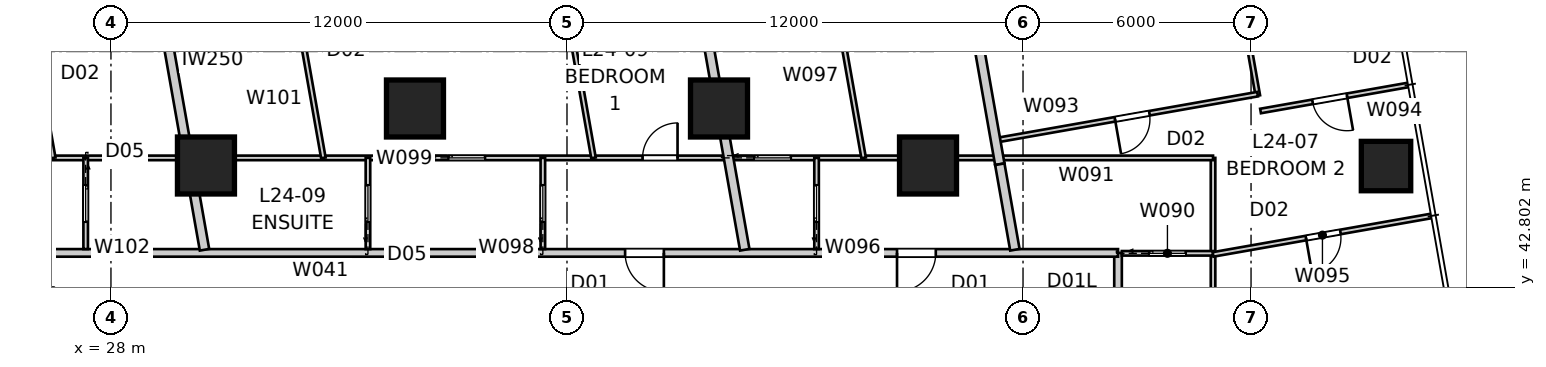
"""IFC4 building model, lengths in metres.
Left out: names, types, materials, properties, quantities, classifications, styles, units other than length and angle.
Written with IfcOpenShell. Run it as: python <this file> out.ifc"""

import sys

from ifc_helpers import new_model, si_unit, direction, frame, frame_2d, origin, origin_2d, place, context, subcontext, project, spatial, rectangle, extrude, element, fill, save


model = new_model("IFC4")
c1 = context("Model", 3, precision=1e-05, world=origin(), true_north=direction((0.0, 1.0)))
c2 = subcontext(c1, "Body", "Model", "MODEL_VIEW")
j1 = project(units=[si_unit("LENGTHUNIT", "METRE"), si_unit("PLANEANGLEUNIT", "RADIAN")], contexts=[c1])
p1 = place(None, origin())
s1 = spatial("IfcSite", under=j1, at=p1, CompositionType="ELEMENT")
p2 = place(p1, origin())
s2 = spatial("IfcBuilding", under=s1, at=p2, CompositionType="ELEMENT")
p3 = place(p2, frame((0.0, 0.0, 89.6)))
s3 = spatial("IfcBuildingStorey", under=s2, at=p3, CompositionType="ELEMENT", Elevation=89.6)
p4 = place(p3, frame((61.552, 45.985, 0.0), z_axis=(0.0, 0.0, 1.0), x_axis=(1.0, 0.0, 0.0)))
e1 = element("IfcColumn", 1, at=p4, inside=s3, PredefinedType="COLUMN", context=c2, shape_type="SweptSolid", body=[
    extrude(rectangle(XDim=1.3, YDim=1.3, at=origin_2d()), origin(), (0.0, 0.0, 1.0), 3.4),
])
for number, where, z_axis, x_axis in (
    (2, (49.5, 46.0, 0.0), (0.0, 0.0, 1.0), (1.0, 0.0, 0.0)),
    (3, (44.0, 47.5, 0.0), (0.0, 0.0, 1.0), (1.0, 0.0, 0.0)),
    (4, (36.0, 47.5, 0.0), (0.0, 0.0, 1.0), (1.0, 0.0, 0.0)),
    (5, (30.5, 46.0, 0.0), (0.0, 0.0, 1.0), (1.0, 0.0, 0.0)),
):
    element("IfcColumn", number, at=place(p3, frame(where, z_axis=z_axis, x_axis=x_axis)), inside=s3, PredefinedType="COLUMN", context=c2, shape_type="SweptSolid", body=[
        extrude(rectangle(XDim=1.5, YDim=1.5, at=origin_2d()), origin(), (0.0, 0.0, 1.0), 3.4),
    ])
p5 = place(p3, frame((54.5, 16.3, 0.0), z_axis=(0.0, 0.0, 1.0), x_axis=(0.0, 1.0, 0.0)))
e6 = element("IfcWall", 6, at=p5, inside=s3, PredefinedType="PARTITIONING", context=c2, shape_type="SweptSolid", body=[
    extrude(rectangle(XDim=27.4, YDim=0.2, at=frame_2d((13.7, 0.0))), origin(), (0.0, 0.0, 1.0), 3.25),
])
p6 = place(p5, frame((19.308, 0.0, 0.0)))
e7 = element("IfcOpeningElement", 7, at=p6, cuts=e6, PredefinedType="OPENING", context=c2, shape_type="SweptSolid", body=[
    extrude(rectangle(XDim=1.02, YDim=2.34, at=frame_2d((0.51, 1.17))), frame((0.0, 0.11, 0.0), z_axis=(0.0, -1.0, 0.0), x_axis=(1.0, 0.0, 0.0)), (0.0, 0.0, 1.0), 0.22),
])
p7 = place(p5, frame((24.687, 0.0, 0.0)))
e8 = element("IfcOpeningElement", 8, at=p7, cuts=e6, PredefinedType="OPENING", context=c2, shape_type="SweptSolid", body=[
    extrude(rectangle(XDim=1.02, YDim=2.1, at=frame_2d((0.51, 1.05))), frame((0.0, 0.11, 0.0), z_axis=(0.0, -1.0, 0.0), x_axis=(1.0, 0.0, 0.0)), (0.0, 0.0, 1.0), 0.22),
])
p8 = place(p5, frame((1.622, 0.0, 0.0)))
e9 = element("IfcOpeningElement", 9, at=p8, cuts=e6, PredefinedType="OPENING", context=c2, shape_type="SweptSolid", body=[
    extrude(rectangle(XDim=1.02, YDim=2.1, at=frame_2d((0.51, 1.05))), frame((0.0, 0.11, 0.0), z_axis=(0.0, -1.0, 0.0), x_axis=(1.0, 0.0, 0.0)), (0.0, 0.0, 1.0), 0.22),
])
p9 = place(p3, frame((54.5, 43.7, 0.0), z_axis=(0.0, 0.0, 1.0), x_axis=(-1.0, 0.0, 0.0)))
e10 = element("IfcWall", 10, at=p9, inside=s3, PredefinedType="PARTITIONING", context=c2, shape_type="SweptSolid", body=[
    extrude(rectangle(XDim=29.0, YDim=0.2, at=frame_2d((14.5, 0.0))), origin(), (0.0, 0.0, 1.0), 3.25),
])
p10 = place(p9, frame((11.951, 0.0, 0.0)))
e11 = element("IfcOpeningElement", 11, at=p10, cuts=e10, PredefinedType="OPENING", context=c2, shape_type="SweptSolid", body=[
    extrude(rectangle(XDim=1.02, YDim=2.34, at=frame_2d((0.51, 1.17))), frame((0.0, 0.11, 0.0), z_axis=(0.0, -1.0, 0.0), x_axis=(1.0, 0.0, 0.0)), (0.0, 0.0, 1.0), 0.22),
])
p11 = place(p9, frame((4.795, 0.0, 0.0)))
e12 = element("IfcOpeningElement", 12, at=p11, cuts=e10, PredefinedType="OPENING", context=c2, shape_type="SweptSolid", body=[
    extrude(rectangle(XDim=1.02, YDim=2.34, at=frame_2d((0.51, 1.17))), frame((0.0, 0.11, 0.0), z_axis=(0.0, -1.0, 0.0), x_axis=(1.0, 0.0, 0.0)), (0.0, 0.0, 1.0), 0.22),
])
p12 = place(p3, frame((42.552, 55.836, 0.0), z_axis=(0.0, 0.0, 1.0), x_axis=(0.173639677872, -0.984809251718, 0.0)))
e13 = element("IfcWall", 13, at=p12, inside=s3, PredefinedType="PARTITIONING", context=c2, shape_type="SweptSolid", body=[
    extrude(rectangle(XDim=12.24, YDim=0.25, at=frame_2d((6.12, 0.0))), origin(), (0.0, 0.0, 1.0), 3.25),
])
p13 = place(p3, frame((28.765, 53.405, 0.0), z_axis=(0.0, 0.0, 1.0), x_axis=(0.173658469802, -0.984805938176, 0.0)))
e14 = element("IfcWall", 14, at=p13, inside=s3, PredefinedType="PARTITIONING", context=c2, shape_type="SweptSolid", body=[
    extrude(rectangle(XDim=9.771, YDim=0.25, at=frame_2d((4.885, 0.0))), origin(), (0.0, 0.0, 1.0), 3.25),
])
p14 = place(p3, frame((49.62, 56.066, 0.0), z_axis=(0.0, 0.0, 1.0), x_axis=(0.173644522411, -0.984808397525, 0.0)))
e15 = element("IfcWall", 15, at=p14, inside=s3, PredefinedType="PARTITIONING", context=c2, shape_type="SweptSolid", body=[
    extrude(rectangle(XDim=10.188, YDim=0.25, at=frame_2d((5.094, 0.0))), origin(), (0.0, 0.0, 1.0), 2.638),
])
p15 = place(p3, frame((51.389, 46.033, 0.0), z_axis=(0.0, 0.0, 1.0), x_axis=(0.173657387043, -0.984806129106, 0.0)))
e16 = element("IfcWall", 16, at=p15, inside=s3, PredefinedType="PARTITIONING", context=c2, shape_type="SweptSolid", body=[
    extrude(rectangle(XDim=2.286, YDim=0.25, at=frame_2d((1.143, 0.0))), origin(), (0.0, 0.0, 1.0), 3.25),
])
p16 = place(p3, frame((57.0, 46.2, 0.0), z_axis=(0.0, 0.0, 1.0), x_axis=(0.0, -1.0, 0.0)))
e17 = element("IfcWall", 17, at=p16, inside=s3, PredefinedType="PARTITIONING", context=c2, shape_type="SweptSolid", body=[
    extrude(rectangle(XDim=32.4, YDim=0.12, at=frame_2d((16.2, 0.0))), origin(), (0.0, 0.0, 1.0), 2.55),
])
p17 = place(p16, frame((10.396, 0.0, 0.0)))
e18 = element("IfcOpeningElement", 18, at=p17, cuts=e17, PredefinedType="OPENING", context=c2, shape_type="SweptSolid", body=[
    extrude(rectangle(XDim=0.92, YDim=2.34, at=frame_2d((0.46, 1.17))), frame((0.0, 0.07, 0.0), z_axis=(0.0, -1.0, 0.0), x_axis=(1.0, 0.0, 0.0)), (0.0, 0.0, 1.0), 0.14),
])
p18 = place(p16, frame((7.587, 0.0, 0.0)))
e19 = element("IfcOpeningElement", 19, at=p18, cuts=e17, PredefinedType="OPENING", context=c2, shape_type="SweptSolid", body=[
    extrude(rectangle(XDim=0.92, YDim=2.34, at=frame_2d((0.46, 1.17))), frame((0.0, 0.07, 0.0), z_axis=(0.0, -1.0, 0.0), x_axis=(1.0, 0.0, 0.0)), (0.0, 0.0, 1.0), 0.14),
])
p19 = place(p16, frame((3.843, 0.0, 0.0)))
e20 = element("IfcOpeningElement", 20, at=p19, cuts=e17, PredefinedType="OPENING", context=c2, shape_type="SweptSolid", body=[
    extrude(rectangle(XDim=0.92, YDim=2.34, at=frame_2d((0.46, 1.17))), frame((0.0, 0.07, 0.0), z_axis=(0.0, -1.0, 0.0), x_axis=(1.0, 0.0, 0.0)), (0.0, 0.0, 1.0), 0.14),
])
p20 = place(p16, frame((27.988, 0.0, 0.0)))
e21 = element("IfcOpeningElement", 21, at=p20, cuts=e17, PredefinedType="OPENING", context=c2, shape_type="SweptSolid", body=[
    extrude(rectangle(XDim=0.92, YDim=2.34, at=frame_2d((0.46, 1.17))), frame((0.0, 0.07, 0.0), z_axis=(0.0, -1.0, 0.0), x_axis=(1.0, 0.0, 0.0)), (0.0, 0.0, 1.0), 0.14),
])
p21 = place(p16, frame((23.957, 0.0, 0.0)))
e22 = element("IfcOpeningElement", 22, at=p21, cuts=e17, PredefinedType="OPENING", context=c2, shape_type="SweptSolid", body=[
    extrude(rectangle(XDim=0.96, YDim=2.1, at=frame_2d((0.48, 1.05))), frame((0.0, 0.07, 0.0), z_axis=(0.0, -1.0, 0.0), x_axis=(1.0, 0.0, 0.0)), (0.0, 0.0, 1.0), 0.14),
])
p22 = place(p16, frame((21.108, 0.0, 0.0)))
e23 = element("IfcOpeningElement", 23, at=p22, cuts=e17, PredefinedType="OPENING", context=c2, shape_type="SweptSolid", body=[
    extrude(rectangle(XDim=0.96, YDim=2.1, at=frame_2d((0.48, 1.05))), frame((0.0, 0.07, 0.0), z_axis=(0.0, -1.0, 0.0), x_axis=(1.0, 0.0, 0.0)), (0.0, 0.0, 1.0), 0.14),
])
p23 = place(p3, frame((54.6, 43.689, 0.0), z_axis=(0.0, 0.0, 1.0), x_axis=(1.0, 0.0, 0.0)))
e24 = element("IfcWall", 24, at=p23, inside=s3, PredefinedType="PARTITIONING", context=c2, shape_type="SweptSolid", body=[
    extrude(rectangle(XDim=2.4, YDim=0.12, at=frame_2d((1.2, 0.0))), origin(), (0.0, 0.0, 1.0), 3.25),
])
p24 = place(p23, frame((0.72, 0.0, 0.0)))
e25 = element("IfcOpeningElement", 25, at=p24, cuts=e24, PredefinedType="OPENING", context=c2, shape_type="SweptSolid", body=[
    extrude(rectangle(XDim=0.96, YDim=2.1, at=frame_2d((0.48, 1.05))), frame((0.0, 0.07, 0.0), z_axis=(0.0, -1.0, 0.0), x_axis=(1.0, 0.0, 0.0)), (0.0, 0.0, 1.0), 0.14),
])
p25 = place(p3, frame((23.0, 46.2, 0.0), z_axis=(0.0, 0.0, 1.0), x_axis=(1.0, 0.0, 0.0)))
e26 = element("IfcWall", 26, at=p25, inside=s3, PredefinedType="PARTITIONING", context=c2, shape_type="SweptSolid", body=[
    extrude(rectangle(XDim=34.0, YDim=0.12, at=frame_2d((17.0, 0.0))), origin(), (0.0, 0.0, 1.0), 2.55),
])
p26 = place(p25, frame((18.989, 0.0, 0.0)))
e27 = element("IfcOpeningElement", 27, at=p26, cuts=e26, PredefinedType="OPENING", context=c2, shape_type="SweptSolid", body=[
    extrude(rectangle(XDim=0.92, YDim=2.34, at=frame_2d((0.46, 1.17))), frame((0.0, 0.07, 0.0), z_axis=(0.0, -1.0, 0.0), x_axis=(1.0, 0.0, 0.0)), (0.0, 0.0, 1.0), 0.14),
])
p27 = place(p25, frame((1.306, 0.0, 0.0)))
e28 = element("IfcOpeningElement", 28, at=p27, cuts=e26, PredefinedType="OPENING", context=c2, shape_type="SweptSolid", body=[
    extrude(rectangle(XDim=0.92, YDim=2.34, at=frame_2d((0.46, 1.17))), frame((0.0, 0.07, 0.0), z_axis=(0.0, -1.0, 0.0), x_axis=(1.0, 0.0, 0.0)), (0.0, 0.0, 1.0), 0.14),
])
p28 = place(p25, frame((13.884, 0.0, 0.0)))
e29 = element("IfcOpeningElement", 29, at=p28, cuts=e26, PredefinedType="OPENING", context=c2, shape_type="SweptSolid", body=[
    extrude(rectangle(XDim=0.96, YDim=2.1, at=frame_2d((0.48, 1.05))), frame((0.0, 0.07, 0.0), z_axis=(0.0, -1.0, 0.0), x_axis=(1.0, 0.0, 0.0)), (0.0, 0.0, 1.0), 0.14),
])
p29 = place(p25, frame((21.929, 0.0, 0.0)))
e30 = element("IfcOpeningElement", 30, at=p29, cuts=e26, PredefinedType="OPENING", context=c2, shape_type="SweptSolid", body=[
    extrude(rectangle(XDim=0.96, YDim=2.1, at=frame_2d((0.48, 1.05))), frame((0.0, 0.07, 0.0), z_axis=(0.0, -1.0, 0.0), x_axis=(1.0, 0.0, 0.0)), (0.0, 0.0, 1.0), 0.14),
])
p30 = place(p3, frame((57.041, 54.288, 0.0), z_axis=(0.0, 0.0, 1.0), x_axis=(0.173657751636, -0.984806064815, 0.0)))
e31 = element("IfcWall", 31, at=p30, inside=s3, PredefinedType="PARTITIONING", context=c2, shape_type="SweptSolid", body=[
    extrude(rectangle(XDim=6.55, YDim=0.12, at=frame_2d((3.275, 0.0))), origin(), (0.0, 0.0, 1.0), 3.25),
])
p31 = place(p3, frame((58.172, 47.877, 0.0), z_axis=(0.0, 0.0, 1.0), x_axis=(-0.984806372973, -0.173656004074, 0.0)))
e32 = element("IfcWall", 32, at=p31, inside=s3, PredefinedType="PARTITIONING", context=c2, shape_type="SweptSolid", body=[
    extrude(rectangle(XDim=7.0, YDim=0.12, at=frame_2d((3.5, 0.0))), origin(), (0.0, 0.0, 1.0), 3.25),
])
p32 = place(p31, frame((2.89, 0.0, 0.0)))
e33 = element("IfcOpeningElement", 33, at=p32, cuts=e32, PredefinedType="OPENING", context=c2, shape_type="SweptSolid", body=[
    extrude(rectangle(XDim=0.92, YDim=2.34, at=frame_2d((0.46, 1.17))), frame((0.0, 0.07, 0.0), z_axis=(0.0, -1.0, 0.0), x_axis=(1.0, 0.0, 0.0)), (0.0, 0.0, 1.0), 0.14),
])
p33 = place(p3, frame((62.15, 48.122, 0.0), z_axis=(0.0, 0.0, 1.0), x_axis=(-0.984804033163, -0.173669272657, 0.0)))
e34 = element("IfcWall", 34, at=p33, inside=s3, PredefinedType="PARTITIONING", context=c2, shape_type="SweptSolid", body=[
    extrude(rectangle(XDim=3.96, YDim=0.12, at=frame_2d((1.98, 0.0))), origin(), (0.0, 0.0, 1.0), 2.638),
])
p34 = place(p33, frame((1.65, 0.0, 0.0)))
e35 = element("IfcOpeningElement", 35, at=p34, cuts=e34, PredefinedType="OPENING", context=c2, shape_type="SweptSolid", body=[
    extrude(rectangle(XDim=0.92, YDim=2.34, at=frame_2d((0.46, 1.17))), frame((0.0, 0.07, 0.0), z_axis=(0.0, -1.0, 0.0), x_axis=(1.0, 0.0, 0.0)), (0.0, 0.0, 1.0), 0.14),
])
p35 = place(p3, frame((62.758, 44.675, 0.0), z_axis=(0.0, 0.0, 1.0), x_axis=(-0.984810032319, -0.173635250578, 0.0)))
e36 = element("IfcWall", 36, at=p35, inside=s3, PredefinedType="PARTITIONING", context=c2, shape_type="SweptSolid", body=[
    extrude(rectangle(XDim=5.846, YDim=0.12, at=frame_2d((2.923, 0.0))), origin(), (0.0, 0.0, 1.0), 3.25),
])
p36 = place(p35, frame((2.443, 0.0, 0.0)))
e37 = element("IfcOpeningElement", 37, at=p36, cuts=e36, PredefinedType="OPENING", context=c2, shape_type="SweptSolid", body=[
    extrude(rectangle(XDim=0.92, YDim=2.34, at=frame_2d((0.46, 1.17))), frame((0.0, 0.07, 0.0), z_axis=(0.0, -1.0, 0.0), x_axis=(1.0, 0.0, 0.0)), (0.0, 0.0, 1.0), 0.14),
])
p37 = place(p3, frame((46.567, 43.8, 0.0), z_axis=(0.0, 0.0, 1.0), x_axis=(0.0, 1.0, 0.0)))
e38 = element("IfcWall", 38, at=p37, inside=s3, PredefinedType="PARTITIONING", context=c2, shape_type="SweptSolid", body=[
    extrude(rectangle(XDim=2.4, YDim=0.12, at=frame_2d((1.2, 0.0))), origin(), (0.0, 0.0, 1.0), 3.25),
])
p38 = place(p37, frame((0.72, 0.0, 0.0)))
e39 = element("IfcOpeningElement", 39, at=p38, cuts=e38, PredefinedType="OPENING", context=c2, shape_type="SweptSolid", body=[
    extrude(rectangle(XDim=0.96, YDim=2.1, at=frame_2d((0.48, 1.05))), frame((0.0, 0.07, 0.0), z_axis=(0.0, -1.0, 0.0), x_axis=(1.0, 0.0, 0.0)), (0.0, 0.0, 1.0), 0.14),
])
p39 = place(p3, frame((47.805, 46.2, 0.0), z_axis=(0.0, 0.0, 1.0), x_axis=(-0.173653605279, 0.984806795962, 0.0)))
e40 = element("IfcWall", 40, at=p39, inside=s3, PredefinedType="PARTITIONING", context=c2, shape_type="SweptSolid", body=[
    extrude(rectangle(XDim=10.362, YDim=0.12, at=frame_2d((5.181, 0.0))), origin(), (0.0, 0.0, 1.0), 3.25),
])
p40 = place(p39, frame((4.741, 0.0, 0.0)))
e41 = element("IfcOpeningElement", 41, at=p40, cuts=e40, PredefinedType="OPENING", context=c2, shape_type="SweptSolid", body=[
    extrude(rectangle(XDim=0.92, YDim=2.34, at=frame_2d((0.46, 1.17))), frame((0.0, 0.07, 0.0), z_axis=(0.0, -1.0, 0.0), x_axis=(1.0, 0.0, 0.0)), (0.0, 0.0, 1.0), 0.14),
])
p41 = place(p3, frame((39.365, 43.8, 0.0), z_axis=(0.0, 0.0, 1.0), x_axis=(0.0, 1.0, 0.0)))
e42 = element("IfcWall", 42, at=p41, inside=s3, PredefinedType="PARTITIONING", context=c2, shape_type="SweptSolid", body=[
    extrude(rectangle(XDim=2.4, YDim=0.12, at=frame_2d((1.2, 0.0))), origin(), (0.0, 0.0, 1.0), 3.25),
])
p42 = place(p41, frame((0.72, 0.0, 0.0)))
e43 = element("IfcOpeningElement", 43, at=p42, cuts=e42, PredefinedType="OPENING", context=c2, shape_type="SweptSolid", body=[
    extrude(rectangle(XDim=0.96, YDim=2.1, at=frame_2d((0.48, 1.05))), frame((0.0, 0.07, 0.0), z_axis=(0.0, -1.0, 0.0), x_axis=(1.0, 0.0, 0.0)), (0.0, 0.0, 1.0), 0.14),
])
p43 = place(p3, frame((34.763, 43.8, 0.0), z_axis=(0.0, 0.0, 1.0), x_axis=(0.0, 1.0, 0.0)))
e44 = element("IfcWall", 44, at=p43, inside=s3, PredefinedType="PARTITIONING", context=c2, shape_type="SweptSolid", body=[
    extrude(rectangle(XDim=2.4, YDim=0.12, at=frame_2d((1.2, 0.0))), origin(), (0.0, 0.0, 1.0), 3.25),
])
p44 = place(p43, frame((0.72, 0.0, 0.0)))
e45 = element("IfcOpeningElement", 45, at=p44, cuts=e44, PredefinedType="OPENING", context=c2, shape_type="SweptSolid", body=[
    extrude(rectangle(XDim=0.96, YDim=2.1, at=frame_2d((0.48, 1.05))), frame((0.0, 0.07, 0.0), z_axis=(0.0, -1.0, 0.0), x_axis=(1.0, 0.0, 0.0)), (0.0, 0.0, 1.0), 0.14),
])
p45 = place(p3, frame((39.113, 55.188, 0.0), z_axis=(0.0, 0.0, 1.0), x_axis=(0.173652576186, -0.984806977424, 0.0)))
e46 = element("IfcWall", 46, at=p45, inside=s3, PredefinedType="PARTITIONING", context=c2, shape_type="SweptSolid", body=[
    extrude(rectangle(XDim=9.127, YDim=0.12, at=frame_2d((4.563, 0.0))), origin(), (0.0, 0.0, 1.0), 3.25),
])
p46 = place(p3, frame((33.59, 46.2, 0.0), z_axis=(0.0, 0.0, 1.0), x_axis=(-0.173645935638, 0.98480814834, 0.0)))
e47 = element("IfcWall", 47, at=p46, inside=s3, PredefinedType="PARTITIONING", context=c2, shape_type="SweptSolid", body=[
    extrude(rectangle(XDim=7.893, YDim=0.12, at=frame_2d((3.947, 0.0))), origin(), (0.0, 0.0, 1.0), 3.25),
])
p47 = place(p46, frame((3.507, 0.0, 0.0)))
e48 = element("IfcOpeningElement", 48, at=p47, cuts=e47, PredefinedType="OPENING", context=c2, shape_type="SweptSolid", body=[
    extrude(rectangle(XDim=0.92, YDim=2.34, at=frame_2d((0.46, 1.17))), frame((0.0, 0.07, 0.0), z_axis=(0.0, -1.0, 0.0), x_axis=(1.0, 0.0, 0.0)), (0.0, 0.0, 1.0), 0.14),
])
p48 = place(p3, frame((27.335, 46.2, 0.0), z_axis=(0.0, 0.0, 1.0), x_axis=(0.0, -1.0, 0.0)))
e49 = element("IfcWall", 49, at=p48, inside=s3, PredefinedType="PARTITIONING", context=c2, shape_type="SweptSolid", body=[
    extrude(rectangle(XDim=2.4, YDim=0.12, at=frame_2d((1.2, 0.0))), origin(), (0.0, 0.0, 1.0), 2.722),
])
p49 = place(p48, frame((0.72, 0.0, 0.0)))
e50 = element("IfcOpeningElement", 50, at=p49, cuts=e49, PredefinedType="OPENING", context=c2, shape_type="SweptSolid", body=[
    extrude(rectangle(XDim=0.96, YDim=2.1, at=frame_2d((0.48, 1.05))), frame((0.0, 0.07, 0.0), z_axis=(0.0, -1.0, 0.0), x_axis=(1.0, 0.0, 0.0)), (0.0, 0.0, 1.0), 0.14),
])
p50 = place(p3, frame((26.481, 46.2, 0.0), z_axis=(0.0, 0.0, 1.0), x_axis=(-0.173643103339, 0.98480864774, 0.0)))
e51 = element("IfcWall", 51, at=p50, inside=s3, PredefinedType="PARTITIONING", context=c2, shape_type="SweptSolid", body=[
    extrude(rectangle(XDim=6.659, YDim=0.12, at=frame_2d((3.329, 0.0))), origin(), (0.0, 0.0, 1.0), 3.25),
])
p51 = place(p50, frame((2.889, 0.0, 0.0)))
e52 = element("IfcOpeningElement", 52, at=p51, cuts=e51, PredefinedType="OPENING", context=c2, shape_type="SweptSolid", body=[
    extrude(rectangle(XDim=0.92, YDim=2.34, at=frame_2d((0.46, 1.17))), frame((0.0, 0.07, 0.0), z_axis=(0.0, -1.0, 0.0), x_axis=(1.0, 0.0, 0.0)), (0.0, 0.0, 1.0), 0.14),
])
p52 = place(p10, origin())
e53 = element("IfcDoor", 53, at=p52, inside=s3, OperationType="SINGLE_SWING_LEFT", PredefinedType="DOOR", context=c2, shape_type="SweptSolid", body=[
    extrude(rectangle(XDim=1.02, YDim=2.34, at=frame_2d((0.51, 1.17))), frame((0.0, 0.025, 0.0), z_axis=(0.0, -1.0, 0.0), x_axis=(1.0, 0.0, 0.0)), (0.0, 0.0, 1.0), 0.05),
])
fill(e11, e53)
p53 = place(p11, origin())
e54 = element("IfcDoor", 54, at=p53, inside=s3, OperationType="SINGLE_SWING_RIGHT", PredefinedType="DOOR", context=c2, shape_type="SweptSolid", body=[
    extrude(rectangle(XDim=1.02, YDim=2.34, at=frame_2d((0.51, 1.17))), frame((0.0, 0.025, 0.0), z_axis=(0.0, -1.0, 0.0), x_axis=(1.0, 0.0, 0.0)), (0.0, 0.0, 1.0), 0.05),
])
fill(e12, e54)
p54 = place(p26, origin())
e55 = element("IfcDoor", 55, at=p54, inside=s3, OperationType="SINGLE_SWING_RIGHT", PredefinedType="DOOR", context=c2, shape_type="SweptSolid", body=[
    extrude(rectangle(XDim=0.92, YDim=2.34, at=frame_2d((0.46, 1.17))), frame((0.0, 0.025, 0.0), z_axis=(0.0, -1.0, 0.0), x_axis=(1.0, 0.0, 0.0)), (0.0, 0.0, 1.0), 0.05),
])
fill(e27, e55)
p55 = place(p42, origin())
e56 = element("IfcDoor", 56, at=p55, inside=s3, OperationType="SLIDING_TO_LEFT", PredefinedType="DOOR", context=c2, shape_type="SweptSolid", body=[
    extrude(rectangle(XDim=0.96, YDim=2.1, at=frame_2d((0.48, 1.05))), frame((0.0, 0.025, 0.0), z_axis=(0.0, -1.0, 0.0), x_axis=(1.0, 0.0, 0.0)), (0.0, 0.0, 1.0), 0.05),
])
fill(e43, e56)
p56 = place(p38, origin())
e57 = element("IfcDoor", 57, at=p56, inside=s3, OperationType="SLIDING_TO_LEFT", PredefinedType="DOOR", context=c2, shape_type="SweptSolid", body=[
    extrude(rectangle(XDim=0.96, YDim=2.1, at=frame_2d((0.48, 1.05))), frame((0.0, 0.025, 0.0), z_axis=(0.0, -1.0, 0.0), x_axis=(1.0, 0.0, 0.0)), (0.0, 0.0, 1.0), 0.05),
])
fill(e39, e57)
p57 = place(p24, origin())
e58 = element("IfcDoor", 58, at=p57, inside=s3, OperationType="SLIDING_TO_LEFT", PredefinedType="DOOR", context=c2, shape_type="SweptSolid", body=[
    extrude(rectangle(XDim=0.96, YDim=2.1, at=frame_2d((0.48, 1.05))), frame((0.0, 0.025, 0.0), z_axis=(0.0, -1.0, 0.0), x_axis=(1.0, 0.0, 0.0)), (0.0, 0.0, 1.0), 0.05),
])
fill(e25, e58)
p58 = place(p49, origin())
e59 = element("IfcDoor", 59, at=p58, inside=s3, OperationType="SLIDING_TO_LEFT", PredefinedType="DOOR", context=c2, shape_type="SweptSolid", body=[
    extrude(rectangle(XDim=0.96, YDim=2.1, at=frame_2d((0.48, 1.05))), frame((0.0, 0.025, 0.0), z_axis=(0.0, -1.0, 0.0), x_axis=(1.0, 0.0, 0.0)), (0.0, 0.0, 1.0), 0.05),
])
fill(e50, e59)
p59 = place(p28, origin())
e60 = element("IfcDoor", 60, at=p59, inside=s3, OperationType="SLIDING_TO_LEFT", PredefinedType="DOOR", context=c2, shape_type="SweptSolid", body=[
    extrude(rectangle(XDim=0.96, YDim=2.1, at=frame_2d((0.48, 1.05))), frame((0.0, 0.025, 0.0), z_axis=(0.0, -1.0, 0.0), x_axis=(1.0, 0.0, 0.0)), (0.0, 0.0, 1.0), 0.05),
])
fill(e29, e60)
p60 = place(p44, origin())
e61 = element("IfcDoor", 61, at=p60, inside=s3, OperationType="SLIDING_TO_LEFT", PredefinedType="DOOR", context=c2, shape_type="SweptSolid", body=[
    extrude(rectangle(XDim=0.96, YDim=2.1, at=frame_2d((0.48, 1.05))), frame((0.0, 0.025, 0.0), z_axis=(0.0, -1.0, 0.0), x_axis=(1.0, 0.0, 0.0)), (0.0, 0.0, 1.0), 0.05),
])
fill(e45, e61)
p61 = place(p29, origin())
e62 = element("IfcDoor", 62, at=p61, inside=s3, OperationType="SLIDING_TO_LEFT", PredefinedType="DOOR", context=c2, shape_type="SweptSolid", body=[
    extrude(rectangle(XDim=0.96, YDim=2.1, at=frame_2d((0.48, 1.05))), frame((0.0, 0.025, 0.0), z_axis=(0.0, -1.0, 0.0), x_axis=(1.0, 0.0, 0.0)), (0.0, 0.0, 1.0), 0.05),
])
fill(e30, e62)
p62 = place(p36, origin())
e63 = element("IfcDoor", 63, at=p62, inside=s3, OperationType="SINGLE_SWING_RIGHT", PredefinedType="DOOR", context=c2, shape_type="SweptSolid", body=[
    extrude(rectangle(XDim=0.92, YDim=2.34, at=frame_2d((0.46, 1.17))), frame((0.0, 0.025, 0.0), z_axis=(0.0, -1.0, 0.0), x_axis=(1.0, 0.0, 0.0)), (0.0, 0.0, 1.0), 0.05),
])
fill(e37, e63)
p63 = place(p32, origin())
e64 = element("IfcDoor", 64, at=p63, inside=s3, OperationType="SINGLE_SWING_RIGHT", PredefinedType="DOOR", context=c2, shape_type="SweptSolid", body=[
    extrude(rectangle(XDim=0.92, YDim=2.34, at=frame_2d((0.46, 1.17))), frame((0.0, 0.025, 0.0), z_axis=(0.0, -1.0, 0.0), x_axis=(1.0, 0.0, 0.0)), (0.0, 0.0, 1.0), 0.05),
])
fill(e33, e64)
p64 = place(p34, origin())
e65 = element("IfcDoor", 65, at=p64, inside=s3, OperationType="SINGLE_SWING_LEFT", PredefinedType="DOOR", context=c2, shape_type="SweptSolid", body=[
    extrude(rectangle(XDim=0.92, YDim=2.34, at=frame_2d((0.46, 1.17))), frame((0.0, 0.025, 0.0), z_axis=(0.0, -1.0, 0.0), x_axis=(1.0, 0.0, 0.0)), (0.0, 0.0, 1.0), 0.05),
])
fill(e35, e65)
save(model, sys.argv[1])
